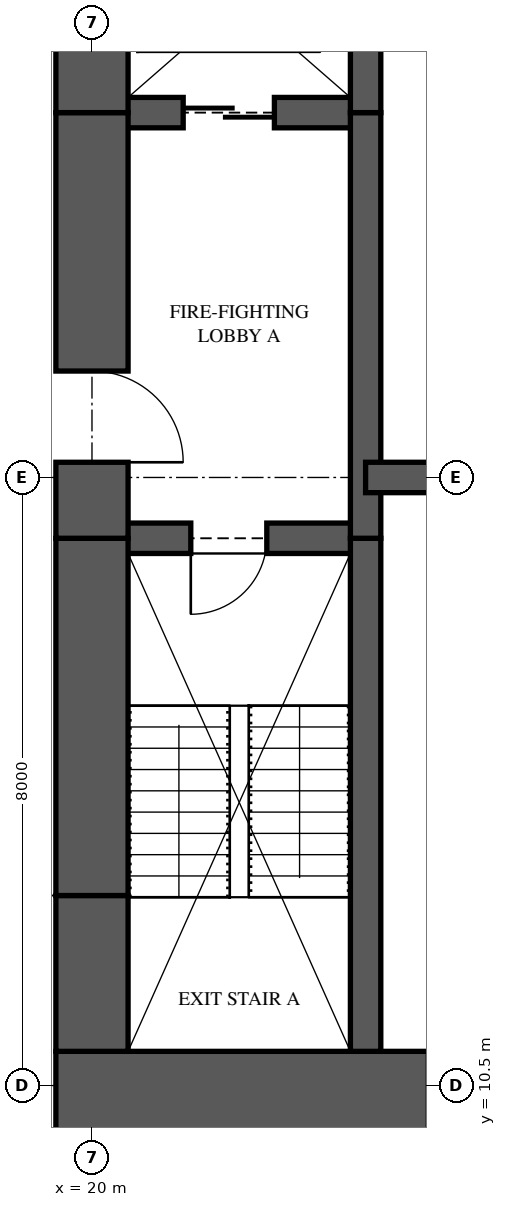
"""IFC4 building model, lengths in metres.
Left out: names, types, materials, properties, quantities, classifications, styles, units other than length and angle.
Written with IfcOpenShell. Run it as: python <this file> out.ifc"""

import sys

from ifc_helpers import new_model, si_unit, direction, frame, frame_2d, origin, place, context, subcontext, project, spatial, rectangle, extrude, element, fill, save


model = new_model("IFC4")
c1 = context("Model", 3, precision=1e-05, world=origin(), true_north=direction((0.0, 1.0)))
c2 = subcontext(c1, "Body", "Model", "MODEL_VIEW")
j1 = project(units=[si_unit("LENGTHUNIT", "METRE"), si_unit("PLANEANGLEUNIT", "RADIAN")], contexts=[c1])
p1 = place(None, origin())
s1 = spatial("IfcSite", under=j1, at=p1, CompositionType="ELEMENT")
p2 = place(p1, origin())
s2 = spatial("IfcBuilding", under=s1, at=p2, CompositionType="ELEMENT")
p3 = place(p2, frame((0.0, 0.0, 27.7)))
s3 = spatial("IfcBuildingStorey", under=s2, at=p3, CompositionType="ELEMENT", Elevation=27.7)
p4 = place(p3, frame((19.525, 10.125, 0.0), z_axis=(0.0, 0.0, 1.0), x_axis=(1.0, 0.0, 0.0)))
e1 = element("IfcWall", 1, at=p4, inside=s3, PredefinedType="SHEAR", context=c2, shape_type="SweptSolid", body=[
    extrude(rectangle(XDim=6.475, YDim=1.65, at=frame_2d((3.238, 0.0))), origin(), (0.0, 0.0, 1.0), 3.35),
])
p5 = place(p4, frame((4.9, 0.0, 0.0)))
e2 = element("IfcOpeningElement", 2, at=p5, cuts=e1, PredefinedType="OPENING", context=c2, shape_type="SweptSolid", body=[
    extrude(rectangle(XDim=0.75, YDim=2.1, at=frame_2d((0.375, 1.05))), frame((0.0, 0.835, 0.0), z_axis=(0.0, -1.0, 0.0), x_axis=(1.0, 0.0, 0.0)), (0.0, 0.0, 1.0), 1.67),
])
p6 = place(p3, frame((20.0, 26.05, 0.0), z_axis=(0.0, 0.0, 1.0), x_axis=(0.0, -1.0, 0.0)))
e3 = element("IfcWall", 3, at=p6, inside=s3, PredefinedType="SHEAR", context=c2, shape_type="SweptSolid", body=[
    extrude(rectangle(XDim=2.75, YDim=0.95, at=frame_2d((1.375, 0.0))), origin(), (0.0, 0.0, 1.0), 3.35),
])
p7 = place(p3, frame((20.0, 23.3, 0.0), z_axis=(0.0, 0.0, 1.0), x_axis=(0.0, -1.0, 0.0)))
e4 = element("IfcWall", 4, at=p7, inside=s3, PredefinedType="SHEAR", context=c2, shape_type="SweptSolid", body=[
    extrude(rectangle(XDim=5.6, YDim=0.95, at=frame_2d((2.8, 0.0))), origin(), (0.0, 0.0, 1.0), 3.35),
])
p8 = place(p7, frame((3.4, 0.0, 0.0)))
e5 = element("IfcOpeningElement", 5, at=p8, cuts=e4, PredefinedType="OPENING", context=c2, shape_type="SweptSolid", body=[
    extrude(rectangle(XDim=1.2, YDim=2.2, at=frame_2d((0.6, 1.1))), frame((0.0, 0.485, 0.0), z_axis=(0.0, -1.0, 0.0), x_axis=(1.0, 0.0, 0.0)), (0.0, 0.0, 1.0), 0.97),
])
p9 = place(p3, frame((20.0, 17.7, 0.0), z_axis=(0.0, 0.0, 1.0), x_axis=(0.0, -1.0, 0.0)))
e6 = element("IfcWall", 6, at=p9, inside=s3, PredefinedType="SHEAR", context=c2, shape_type="SweptSolid", body=[
    extrude(rectangle(XDim=4.7, YDim=0.95, at=frame_2d((2.35, 0.0))), origin(), (0.0, 0.0, 1.0), 3.35),
])
p10 = place(p3, frame((20.0, 13.0, 0.0), z_axis=(0.0, 0.0, 1.0), x_axis=(0.0, -1.0, 0.0)))
e7 = element("IfcWall", 7, at=p10, inside=s3, PredefinedType="SHEAR", context=c2, shape_type="SweptSolid", body=[
    extrude(rectangle(XDim=2.05, YDim=0.95, at=frame_2d((1.025, 0.0))), origin(), (0.0, 0.0, 1.0), 3.35),
])
p11 = place(p3, frame((23.6, 10.95, 0.0), z_axis=(0.0, 0.0, 1.0), x_axis=(0.0, 1.0, 0.0)))
e8 = element("IfcWall", 8, at=p11, inside=s3, PredefinedType="SHEAR", context=c2, shape_type="SweptSolid", body=[
    extrude(rectangle(XDim=6.75, YDim=0.4, at=frame_2d((3.375, 0.0))), origin(), (0.0, 0.0, 1.0), 3.35),
])
p12 = place(p3, frame((23.6, 17.7, 0.0), z_axis=(0.0, 0.0, 1.0), x_axis=(0.0, 1.0, 0.0)))
e9 = element("IfcWall", 9, at=p12, inside=s3, PredefinedType="SHEAR", context=c2, shape_type="SweptSolid", body=[
    extrude(rectangle(XDim=5.6, YDim=0.4, at=frame_2d((2.8, 0.0))), origin(), (0.0, 0.0, 1.0), 3.35),
])
p13 = place(p3, frame((23.6, 23.3, 0.0), z_axis=(0.0, 0.0, 1.0), x_axis=(0.0, 1.0, 0.0)))
e10 = element("IfcWall", 10, at=p13, inside=s3, PredefinedType="SHEAR", context=c2, shape_type="SweptSolid", body=[
    extrude(rectangle(XDim=2.75, YDim=0.4, at=frame_2d((1.375, 0.0))), origin(), (0.0, 0.0, 1.0), 3.35),
])
p14 = place(p3, frame((20.0, 17.7, 0.0), z_axis=(0.0, 0.0, 1.0), x_axis=(1.0, 0.0, 0.0)))
e11 = element("IfcWall", 11, at=p14, inside=s3, PredefinedType="SHEAR", context=c2, shape_type="SweptSolid", body=[
    extrude(rectangle(XDim=3.6, YDim=0.4, at=frame_2d((1.8, 0.0))), origin(), (0.0, 0.0, 1.0), 3.35),
])
p15 = place(p14, frame((1.3, 0.0, 0.0)))
e12 = element("IfcOpeningElement", 12, at=p15, cuts=e11, PredefinedType="OPENING", context=c2, shape_type="SweptSolid", body=[
    extrude(rectangle(XDim=1.0, YDim=2.1, at=frame_2d((0.5, 1.05))), frame((0.0, 0.21, 0.0), z_axis=(0.0, -1.0, 0.0), x_axis=(1.0, 0.0, 0.0)), (0.0, 0.0, 1.0), 0.42),
])
p16 = place(p3, frame((20.0, 23.3, 0.0), z_axis=(0.0, 0.0, 1.0), x_axis=(1.0, 0.0, 0.0)))
e13 = element("IfcWall", 13, at=p16, inside=s3, PredefinedType="SHEAR", context=c2, shape_type="SweptSolid", body=[
    extrude(rectangle(XDim=3.6, YDim=0.4, at=frame_2d((1.8, 0.0))), origin(), (0.0, 0.0, 1.0), 3.35),
])
p17 = place(p16, frame((1.2, 0.0, 0.0)))
e14 = element("IfcOpeningElement", 14, at=p17, cuts=e13, PredefinedType="OPENING", context=c2, shape_type="SweptSolid", body=[
    extrude(rectangle(XDim=1.2, YDim=2.1, at=frame_2d((0.6, 1.05))), frame((0.0, 0.21, 0.0), z_axis=(0.0, -1.0, 0.0), x_axis=(1.0, 0.0, 0.0)), (0.0, 0.0, 1.0), 0.42),
])
p18 = place(p3, frame((23.6, 18.5, 0.0), z_axis=(0.0, 0.0, 1.0), x_axis=(1.0, 0.0, 0.0)))
e15 = element("IfcWall", 15, at=p18, inside=s3, PredefinedType="SHEAR", context=c2, shape_type="SweptSolid", body=[
    extrude(rectangle(XDim=2.4, YDim=0.4, at=frame_2d((1.2, 0.0))), origin(), (0.0, 0.0, 1.0), 3.35),
])
p19 = place(p15, frame((1.0, 0.0, 0.0), z_axis=(0.0, 0.0, 1.0), x_axis=(-1.0, 0.0, 0.0)))
e16 = element("IfcDoor", 16, at=p19, inside=s3, OperationType="SINGLE_SWING_RIGHT", PredefinedType="DOOR", context=c2, shape_type="SweptSolid", body=[
    extrude(rectangle(XDim=1.0, YDim=2.1, at=frame_2d((0.5, 1.05))), frame((0.0, 0.025, 0.0), z_axis=(0.0, -1.0, 0.0), x_axis=(1.0, 0.0, 0.0)), (0.0, 0.0, 1.0), 0.05),
])
fill(e12, e16)
p20 = place(p8, origin())
e17 = element("IfcDoor", 17, at=p20, inside=s3, OperationType="SINGLE_SWING_RIGHT", PredefinedType="DOOR", context=c2, shape_type="SweptSolid", body=[
    extrude(rectangle(XDim=1.2, YDim=2.2, at=frame_2d((0.6, 1.1))), frame((0.0, 0.025, 0.0), z_axis=(0.0, -1.0, 0.0), x_axis=(1.0, 0.0, 0.0)), (0.0, 0.0, 1.0), 0.05),
])
fill(e5, e17)
p21 = place(p17, origin())
e18 = element("IfcDoor", 18, at=p21, inside=s3, OperationType="SLIDING_TO_LEFT", PredefinedType="DOOR", context=c2, shape_type="SweptSolid", body=[
    extrude(rectangle(XDim=1.2, YDim=2.1, at=frame_2d((0.6, 1.05))), frame((0.0, 0.025, 0.0), z_axis=(0.0, -1.0, 0.0), x_axis=(1.0, 0.0, 0.0)), (0.0, 0.0, 1.0), 0.05),
])
fill(e14, e18)
save(model, sys.argv[1])
